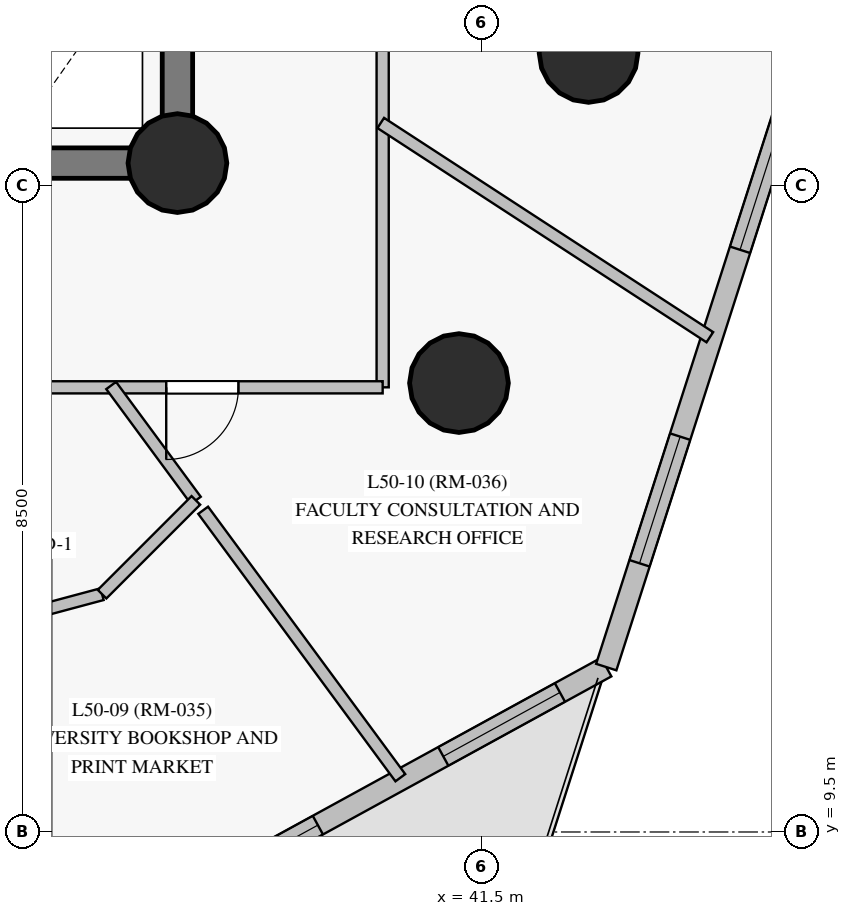
"""IFC4 building model, lengths in metres.
Left out: names, types, materials, properties, quantities, classifications, styles, units other than length and angle.
Written with IfcOpenShell. Run it as: python <this file> out.ifc"""

import sys

from ifc_helpers import new_model, si_unit, direction, frame, frame_2d, origin, origin_with_axes, origin_2d, place, context, subcontext, project, spatial, rectangle, circle, extrude, source, transform, mapped, element, fill, save


model = new_model("IFC4")
c1 = context("Model", 3, precision=1e-05, world=origin(), true_north=direction((0.0, 1.0)))
c2 = subcontext(c1, "Body", "Model", "MODEL_VIEW")
j1 = project(units=[si_unit("LENGTHUNIT", "METRE"), si_unit("PLANEANGLEUNIT", "RADIAN")], contexts=[c1])
p1 = place(None, origin())
s1 = spatial("IfcSite", under=j1, at=p1, CompositionType="ELEMENT")
p2 = place(p1, origin())
s2 = spatial("IfcBuilding", under=s1, at=p2, CompositionType="ELEMENT")
p3 = place(p2, frame((0.0, 0.0, 174.85)))
s3 = spatial("IfcBuildingStorey", under=s2, at=p3, CompositionType="ELEMENT", Elevation=174.85)
p4 = place(p3, frame((26.55, 18.3, 0.0), z_axis=(0.0, 0.0, 1.0), x_axis=(1.0, 0.0, 0.0)))
e1 = element("IfcWall", 1, at=p4, inside=s3, PredefinedType="SHEAR", context=c2, shape_type="SweptSolid", body=[
    extrude(rectangle(XDim=10.95, YDim=0.4, at=frame_2d((5.475, 0.0))), origin(), (0.0, 0.0, 1.0), 2.825),
])
p5 = place(p4, frame((4.55, 0.0, 0.0)))
e2 = element("IfcOpeningElement", 2, at=p5, cuts=e1, PredefinedType="OPENING", context=c2, shape_type="SweptSolid", body=[
    extrude(rectangle(XDim=1.4, YDim=2.2, at=frame_2d((0.7, 1.1))), frame((0.0, 0.21, 0.0), z_axis=(0.0, -1.0, 0.0), x_axis=(1.0, 0.0, 0.0)), (0.0, 0.0, 1.0), 0.42),
])
p6 = place(p3, frame((37.5, 18.3, 0.0), z_axis=(0.0, 0.0, 1.0), x_axis=(0.0, 1.0, 0.0)))
e3 = element("IfcWall", 3, at=p6, inside=s3, PredefinedType="SHEAR", context=c2, shape_type="SweptSolid", body=[
    extrude(rectangle(XDim=16.4, YDim=0.4, at=frame_2d((8.2, 0.0))), origin(), (0.0, 0.0, 1.0), 2.825),
])
p7 = place(p6, frame((14.15, 0.0, 0.0)))
e4 = element("IfcOpeningElement", 4, at=p7, cuts=e3, PredefinedType="OPENING", context=c2, shape_type="SweptSolid", body=[
    extrude(rectangle(XDim=1.2, YDim=2.15, at=frame_2d((0.6, 1.075))), frame((0.0, 0.21, 0.0), z_axis=(0.0, -1.0, 0.0), x_axis=(1.0, 0.0, 0.0)), (0.0, 0.0, 1.0), 0.42),
])
m1 = source(origin_with_axes(), c2, "Body", "SweptSolid", [
    extrude(circle(Radius=0.65, at=origin_2d()), origin(), (0.0, 0.0, 1.0), 3.05),
])
for number, where, z_axis, x_axis in (
    (5, (37.5, 18.3, 0.0), (0.0, 0.0, 1.0), (1.0, 0.0, 0.0)),
    (6, (42.909, 19.749, 0.0), (0.0, 0.0, 1.0), (1.0, 0.0, 0.0)),
    (7, (41.204, 15.406, 0.0), (0.0, 0.0, 1.0), (1.0, 0.0, 0.0)),
):
    element("IfcColumn", number, at=place(p3, frame(where, z_axis=z_axis, x_axis=x_axis)), inside=s3, PredefinedType="COLUMN", context=c2, shape_type="MappedRepresentation", body=[
        mapped(m1, transform((0.0, 0.0, 0.0), scale=1.0)),
    ])
p8 = place(p3, frame((27.227, 2.948, 0.0), z_axis=(0.0, 0.0, 1.0), x_axis=(0.876944285919, 0.480592050906, 0.0)))
e8 = element("IfcWall", 8, at=p8, inside=s3, PredefinedType="SOLIDWALL", context=c2, shape_type="SweptSolid", body=[
    extrude(rectangle(XDim=18.148, YDim=0.28, at=frame_2d((9.074, 0.0))), origin(), (0.0, 0.0, 1.0), 2.825),
])
p9 = place(p8, frame((2.766, 0.0, 0.85)))
e9 = element("IfcOpeningElement", 9, at=p9, cuts=e8, PredefinedType="OPENING", context=c2, shape_type="SweptSolid", body=[
    extrude(rectangle(XDim=1.75, YDim=1.65, at=frame_2d((0.875, 0.825))), frame((0.0, 0.15, 0.0), z_axis=(0.0, -1.0, 0.0), x_axis=(1.0, 0.0, 0.0)), (0.0, 0.0, 1.0), 0.3),
])
p10 = place(p8, frame((12.072, 0.0, 0.85)))
e10 = element("IfcOpeningElement", 10, at=p10, cuts=e8, PredefinedType="OPENING", context=c2, shape_type="SweptSolid", body=[
    extrude(rectangle(XDim=1.75, YDim=1.65, at=frame_2d((0.875, 0.825))), frame((0.0, 0.15, 0.0), z_axis=(0.0, -1.0, 0.0), x_axis=(1.0, 0.0, 0.0)), (0.0, 0.0, 1.0), 0.3),
])
p11 = place(p8, frame((15.703, 0.0, 0.85)))
e11 = element("IfcOpeningElement", 11, at=p11, cuts=e8, PredefinedType="OPENING", context=c2, shape_type="SweptSolid", body=[
    extrude(rectangle(XDim=1.75, YDim=1.65, at=frame_2d((0.875, 0.825))), frame((0.0, 0.15, 0.0), z_axis=(0.0, -1.0, 0.0), x_axis=(1.0, 0.0, 0.0)), (0.0, 0.0, 1.0), 0.3),
])
p12 = place(p8, frame((9.305, 0.0, 0.0)))
e12 = element("IfcOpeningElement", 12, at=p12, cuts=e8, PredefinedType="OPENING", context=c2, shape_type="SweptSolid", body=[
    extrude(rectangle(XDim=1.05, YDim=2.12, at=frame_2d((0.525, 1.06))), frame((0.0, 0.15, 0.0), z_axis=(0.0, -1.0, 0.0), x_axis=(1.0, 0.0, 0.0)), (0.0, 0.0, 1.0), 0.3),
])
p13 = place(p3, frame((43.142, 11.669, 0.0), z_axis=(0.0, 0.0, 1.0), x_axis=(0.305307233787, 0.95225390154, 0.0)))
e13 = element("IfcWall", 13, at=p13, inside=s3, PredefinedType="SOLIDWALL", context=c2, shape_type="SweptSolid", body=[
    extrude(rectangle(XDim=8.783, YDim=0.28, at=frame_2d((4.391, 0.0))), origin(), (0.0, 0.0, 1.0), 2.825),
])
p14 = place(p13, frame((1.434, 0.0, 0.85)))
e14 = element("IfcOpeningElement", 14, at=p14, cuts=e13, PredefinedType="OPENING", context=c2, shape_type="SweptSolid", body=[
    extrude(rectangle(XDim=1.75, YDim=1.65, at=frame_2d((0.875, 0.825))), frame((0.0, 0.15, 0.0), z_axis=(0.0, -1.0, 0.0), x_axis=(1.0, 0.0, 0.0)), (0.0, 0.0, 1.0), 0.3),
])
p15 = place(p13, frame((5.765, 0.0, 0.85)))
e15 = element("IfcOpeningElement", 15, at=p15, cuts=e13, PredefinedType="OPENING", context=c2, shape_type="SweptSolid", body=[
    extrude(rectangle(XDim=1.75, YDim=1.65, at=frame_2d((0.875, 0.825))), frame((0.0, 0.15, 0.0), z_axis=(0.0, -1.0, 0.0), x_axis=(1.0, 0.0, 0.0)), (0.0, 0.0, 1.0), 0.3),
])
p16 = place(p3, frame((40.2, 37.65, 0.0), z_axis=(0.0, 0.0, 1.0), x_axis=(0.0, -1.0, 0.0)))
e16 = element("IfcWall", 16, at=p16, inside=s3, PredefinedType="PARTITIONING", context=c2, shape_type="SweptSolid", body=[
    extrude(rectangle(XDim=22.3, YDim=0.16, at=frame_2d((11.15, 0.0))), origin(), (0.0, 0.0, 1.0), 2.375),
])
p17 = place(p16, frame((14.02, 0.0, 0.0)))
e17 = element("IfcOpeningElement", 17, at=p17, cuts=e16, PredefinedType="OPENING", context=c2, shape_type="SweptSolid", body=[
    extrude(rectangle(XDim=0.95, YDim=2.15, at=frame_2d((0.475, 1.075))), frame((0.0, 0.09, 0.0), z_axis=(0.0, -1.0, 0.0), x_axis=(1.0, 0.0, 0.0)), (0.0, 0.0, 1.0), 0.18),
])
p18 = place(p16, frame((10.675, 0.0, 0.0)))
e18 = element("IfcOpeningElement", 18, at=p18, cuts=e16, PredefinedType="OPENING", context=c2, shape_type="SweptSolid", body=[
    extrude(rectangle(XDim=0.95, YDim=2.15, at=frame_2d((0.475, 1.075))), frame((0.0, 0.09, 0.0), z_axis=(0.0, -1.0, 0.0), x_axis=(1.0, 0.0, 0.0)), (0.0, 0.0, 1.0), 0.18),
])
p19 = place(p16, frame((7.33, 0.0, 0.0)))
e19 = element("IfcOpeningElement", 19, at=p19, cuts=e16, PredefinedType="OPENING", context=c2, shape_type="SweptSolid", body=[
    extrude(rectangle(XDim=0.95, YDim=2.15, at=frame_2d((0.475, 1.075))), frame((0.0, 0.09, 0.0), z_axis=(0.0, -1.0, 0.0), x_axis=(1.0, 0.0, 0.0)), (0.0, 0.0, 1.0), 0.18),
])
p20 = place(p3, frame((40.2, 15.35, 0.0), z_axis=(0.0, 0.0, 1.0), x_axis=(-1.0, 0.0, 0.0)))
e20 = element("IfcWall", 20, at=p20, inside=s3, PredefinedType="PARTITIONING", context=c2, shape_type="SweptSolid", body=[
    extrude(rectangle(XDim=10.65, YDim=0.16, at=frame_2d((5.325, 0.0))), origin(), (0.0, 0.0, 1.0), 2.275),
])
p21 = place(p20, frame((4.85, 0.0, 0.0)))
e21 = element("IfcOpeningElement", 21, at=p21, cuts=e20, PredefinedType="OPENING", context=c2, shape_type="SweptSolid", body=[
    extrude(rectangle(XDim=0.95, YDim=2.15, at=frame_2d((0.475, 1.075))), frame((0.0, 0.09, 0.0), z_axis=(0.0, -1.0, 0.0), x_axis=(1.0, 0.0, 0.0)), (0.0, 0.0, 1.0), 0.18),
])
p22 = place(p20, frame((1.897, 0.0, 0.0)))
e22 = element("IfcOpeningElement", 22, at=p22, cuts=e20, PredefinedType="OPENING", context=c2, shape_type="SweptSolid", body=[
    extrude(rectangle(XDim=0.95, YDim=2.15, at=frame_2d((0.475, 1.075))), frame((0.0, 0.09, 0.0), z_axis=(0.0, -1.0, 0.0), x_axis=(1.0, 0.0, 0.0)), (0.0, 0.0, 1.0), 0.18),
])
p23 = place(p3, frame((36.509, 12.629, 0.0), z_axis=(0.0, 0.0, 1.0), x_axis=(-0.965925605542, -0.258819868939, 0.0)))
e23 = element("IfcWall", 23, at=p23, inside=s3, PredefinedType="PARTITIONING", context=c2, shape_type="SweptSolid", body=[
    extrude(rectangle(XDim=7.234, YDim=0.16, at=frame_2d((3.617, 0.0))), origin(), (0.0, 0.0, 1.0), 2.275),
])
p24 = place(p23, frame((3.142, 0.0, 0.0)))
e24 = element("IfcOpeningElement", 24, at=p24, cuts=e23, PredefinedType="OPENING", context=c2, shape_type="SweptSolid", body=[
    extrude(rectangle(XDim=0.95, YDim=2.15, at=frame_2d((0.475, 1.075))), frame((0.0, 0.09, 0.0), z_axis=(0.0, -1.0, 0.0), x_axis=(1.0, 0.0, 0.0)), (0.0, 0.0, 1.0), 0.18),
])
p25 = place(p3, frame((40.175, 18.828, 0.0), z_axis=(0.0, 0.0, 1.0), x_axis=(0.838056877473, -0.545582871909, 0.0)))
e25 = element("IfcWall", 25, at=p25, inside=s3, PredefinedType="PARTITIONING", context=c2, shape_type="SweptSolid", body=[
    extrude(rectangle(XDim=5.166, YDim=0.16, at=frame_2d((2.583, 0.0))), origin(), (0.0, 0.0, 1.0), 2.825),
])
p26 = place(p3, frame((37.839, 13.732, 0.0), z_axis=(0.0, 0.0, 1.0), x_axis=(0.593429541898, -0.804885941486, 0.0)))
e26 = element("IfcWall", 26, at=p26, inside=s3, PredefinedType="PARTITIONING", context=c2, shape_type="SweptSolid", body=[
    extrude(rectangle(XDim=4.371, YDim=0.16, at=frame_2d((2.186, 0.0))), origin(), (0.0, 0.0, 1.0), 2.825),
])
p27 = place(p3, frame((36.628, 15.374, 0.0), z_axis=(0.0, 0.0, 1.0), x_axis=(0.593385290423, -0.804918565514, 0.0)))
e27 = element("IfcWall", 27, at=p27, inside=s3, PredefinedType="PARTITIONING", context=c2, shape_type="SweptSolid", body=[
    extrude(rectangle(XDim=1.878, YDim=0.16, at=frame_2d((0.939, 0.0))), origin(), (0.0, 0.0, 1.0), 2.825),
])
p28 = place(p3, frame((37.742, 13.863, 0.0), z_axis=(0.0, 0.0, 1.0), x_axis=(-0.707106781187, -0.707106781187, 0.0)))
e28 = element("IfcWall", 28, at=p28, inside=s3, PredefinedType="PARTITIONING", context=c2, shape_type="SweptSolid", body=[
    extrude(rectangle(XDim=1.745, YDim=0.16, at=frame_2d((0.873, 0.0))), origin(), (0.0, 0.0, 1.0), 2.275),
])
m2 = source(origin_with_axes(), c2, "Body", "SweptSolid", [
    extrude(rectangle(XDim=1.75, YDim=1.65, at=frame_2d((0.875, 0.825))), frame((0.0, 0.03, 0.0), z_axis=(0.0, -1.0, 0.0), x_axis=(1.0, 0.0, 0.0)), (0.0, 0.0, 1.0), 0.06),
])
p29 = place(p10, origin())
e29 = element("IfcWindow", 29, at=p29, inside=s3, PartitioningType="SINGLE_PANEL", PredefinedType="WINDOW", context=c2, shape_type="MappedRepresentation", body=[
    mapped(m2, transform((0.0, 0.0, 0.0), scale=1.0)),
])
fill(e10, e29)
p30 = place(p11, origin())
e30 = element("IfcWindow", 30, at=p30, inside=s3, PartitioningType="SINGLE_PANEL", PredefinedType="WINDOW", context=c2, shape_type="MappedRepresentation", body=[
    mapped(m2, transform((0.0, 0.0, 0.0), scale=1.0)),
])
fill(e11, e30)
p31 = place(p14, origin())
e31 = element("IfcWindow", 31, at=p31, inside=s3, PartitioningType="SINGLE_PANEL", PredefinedType="WINDOW", context=c2, shape_type="MappedRepresentation", body=[
    mapped(m2, transform((0.0, 0.0, 0.0), scale=1.0)),
])
fill(e14, e31)
p32 = place(p15, origin())
e32 = element("IfcWindow", 32, at=p32, inside=s3, PartitioningType="SINGLE_PANEL", PredefinedType="WINDOW", context=c2, shape_type="MappedRepresentation", body=[
    mapped(m2, transform((0.0, 0.0, 0.0), scale=1.0)),
])
fill(e15, e32)
m3 = source(origin_with_axes(), c2, "Body", "SweptSolid", [
    extrude(rectangle(XDim=0.95, YDim=2.15, at=frame_2d((0.475, 1.075))), frame((0.0, 0.025, 0.0), z_axis=(0.0, -1.0, 0.0), x_axis=(1.0, 0.0, 0.0)), (0.0, 0.0, 1.0), 0.05),
])
p33 = place(p22, origin())
e33 = element("IfcDoor", 33, at=p33, inside=s3, OperationType="SINGLE_SWING_RIGHT", PredefinedType="DOOR", context=c2, shape_type="MappedRepresentation", body=[
    mapped(m3, transform((0.0, 0.0, 0.0), scale=1.0)),
])
fill(e22, e33)
save(model, sys.argv[1])
